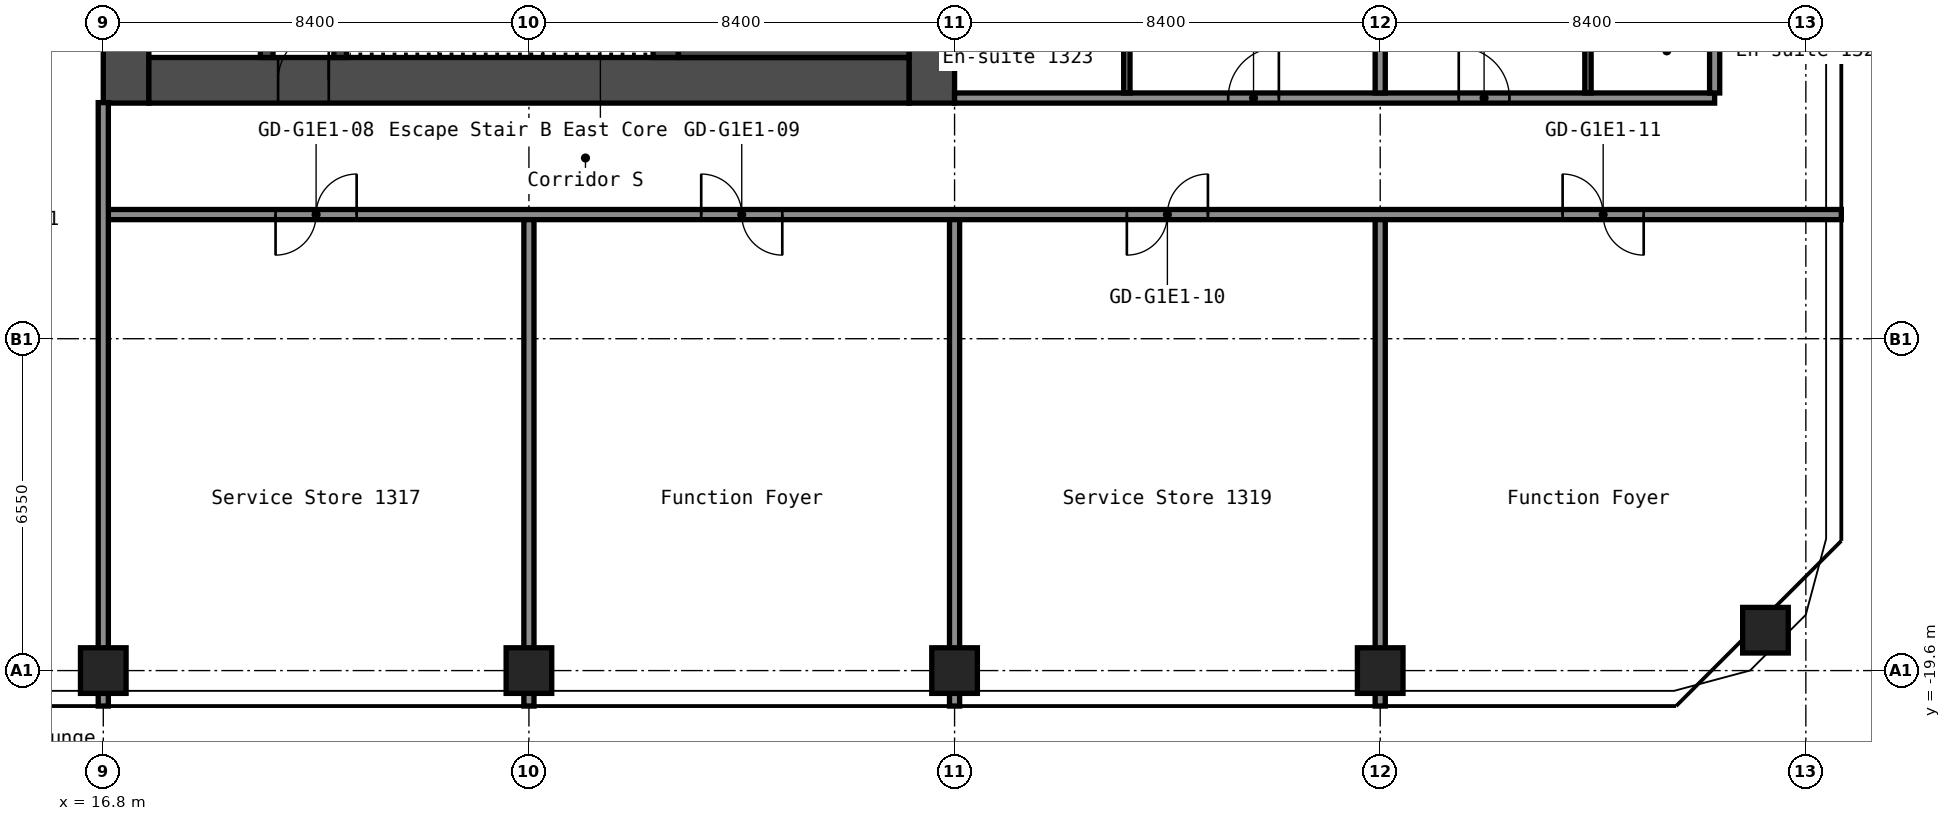
"""IFC4 building model, lengths in metres.
Left out: names, types, materials, properties, quantities, classifications, styles, units other than length and angle.
Written with IfcOpenShell. Run it as: python <this file> out.ifc"""

import sys

from ifc_helpers import new_model, si_unit, direction, frame, frame_2d, origin, origin_2d, place, context, subcontext, project, spatial, rectangle, hollow_rectangle, extrude, element, fill, save


model = new_model("IFC4")
c1 = context("Model", 3, precision=1e-05, world=origin(), true_north=direction((0.0, 1.0)))
c2 = subcontext(c1, "Body", "Model", "MODEL_VIEW")
j1 = project(units=[si_unit("LENGTHUNIT", "METRE"), si_unit("PLANEANGLEUNIT", "RADIAN")], contexts=[c1])
p1 = place(None, origin())
s1 = spatial("IfcSite", under=j1, at=p1, CompositionType="ELEMENT")
p2 = place(p1, origin())
s2 = spatial("IfcBuilding", under=s1, at=p2, CompositionType="ELEMENT")
p3 = place(p2, frame((0.0, 0.0, 48.6)))
s3 = spatial("IfcBuildingStorey", under=s2, at=p3, CompositionType="ELEMENT", Elevation=48.6)
for number, where, z_axis, x_axis in (
    (1, (16.8, -19.6, 0.0), (0.0, 0.0, 1.0), (1.0, 0.0, 0.0)),
    (2, (25.2, -19.6, 0.0), (0.0, 0.0, 1.0), (1.0, 0.0, 0.0)),
    (3, (33.6, -19.6, 0.0), (0.0, 0.0, 1.0), (1.0, 0.0, 0.0)),
    (4, (42.0, -19.6, 0.0), (0.0, 0.0, 1.0), (1.0, 0.0, 0.0)),
    (5, (49.603, -18.803, 0.0), (0.0, 0.0, 1.0), (1.0, 0.0, 0.0)),
):
    element("IfcColumn", number, at=place(p3, frame(where, z_axis=z_axis, x_axis=x_axis)), inside=s3, PredefinedType="COLUMN", context=c2, shape_type="SweptSolid", body=[
        extrude(hollow_rectangle(XDim=0.9, YDim=0.9, WallThickness=0.036, at=origin_2d()), origin(), (0.0, 0.0, 1.0), 2.8),
    ])
p4 = place(p3, frame((17.25, -8.4, 0.0), z_axis=(0.0, 0.0, 1.0), x_axis=(0.0, 1.0, 0.0)))
e6 = element("IfcWall", 6, at=p4, inside=s3, PredefinedType="SHEAR", context=c2, shape_type="SweptSolid", body=[
    extrude(rectangle(XDim=16.8, YDim=0.9, at=frame_2d((8.4, 0.0))), origin(), (0.0, 0.0, 1.0), 2.8),
])
p5 = place(p4, frame((12.75, 0.0, 0.0)))
e7 = element("IfcOpeningElement", 7, at=p5, cuts=e6, PredefinedType="OPENING", context=c2, shape_type="SweptSolid", body=[
    extrude(rectangle(XDim=1.2, YDim=2.1, at=frame_2d((0.6, 1.05))), frame((0.0, 0.46, 0.0), z_axis=(0.0, -1.0, 0.0), x_axis=(1.0, 0.0, 0.0)), (0.0, 0.0, 1.0), 0.92),
])
p6 = place(p4, frame((2.85, 0.0, 0.0)))
e8 = element("IfcOpeningElement", 8, at=p6, cuts=e6, PredefinedType="OPENING", context=c2, shape_type="SweptSolid", body=[
    extrude(rectangle(XDim=1.2, YDim=2.1, at=frame_2d((0.6, 1.05))), frame((0.0, 0.46, 0.0), z_axis=(0.0, -1.0, 0.0), x_axis=(1.0, 0.0, 0.0)), (0.0, 0.0, 1.0), 0.92),
])
p7 = place(p3, frame((33.15, -8.4, 0.0), z_axis=(0.0, 0.0, 1.0), x_axis=(0.0, 1.0, 0.0)))
e9 = element("IfcWall", 9, at=p7, inside=s3, PredefinedType="SHEAR", context=c2, shape_type="SweptSolid", body=[
    extrude(rectangle(XDim=16.8, YDim=0.9, at=frame_2d((8.4, 0.0))), origin(), (0.0, 0.0, 1.0), 2.8),
])
p8 = place(p3, frame((17.7, -7.95, 0.0), z_axis=(0.0, 0.0, 1.0), x_axis=(1.0, 0.0, 0.0)))
e10 = element("IfcWall", 10, at=p8, inside=s3, PredefinedType="SHEAR", context=c2, shape_type="SweptSolid", body=[
    extrude(rectangle(XDim=15.0, YDim=0.9, at=frame_2d((7.5, 0.0))), origin(), (0.0, 0.0, 1.0), 2.8),
])
p9 = place(p8, frame((2.55, 0.0, 0.0)))
e11 = element("IfcOpeningElement", 11, at=p9, cuts=e10, PredefinedType="OPENING", context=c2, shape_type="SweptSolid", body=[
    extrude(rectangle(XDim=1.0, YDim=2.1, at=frame_2d((0.5, 1.05))), frame((0.0, 0.46, 0.0), z_axis=(0.0, -1.0, 0.0), x_axis=(1.0, 0.0, 0.0)), (0.0, 0.0, 1.0), 0.92),
])
p10 = place(p3, frame((20.025, -7.5, 0.0), z_axis=(0.0, 0.0, 1.0), x_axis=(0.0, 1.0, 0.0)))
e12 = element("IfcWall", 12, at=p10, inside=s3, PredefinedType="SHEAR", context=c2, shape_type="SweptSolid", body=[
    extrude(rectangle(XDim=6.3, YDim=0.25, at=frame_2d((3.15, 0.0))), origin(), (0.0, 0.0, 1.0), 2.8),
])
p11 = place(p10, frame((2.4, 0.0, 0.0)))
e13 = element("IfcOpeningElement", 13, at=p11, cuts=e12, PredefinedType="OPENING", context=c2, shape_type="SweptSolid", body=[
    extrude(rectangle(XDim=1.0, YDim=2.1, at=frame_2d((0.5, 1.05))), frame((0.0, 0.135, 0.0), z_axis=(0.0, -1.0, 0.0), x_axis=(1.0, 0.0, 0.0)), (0.0, 0.0, 1.0), 0.27),
])
p12 = place(p3, frame((21.475, -7.5, 0.0), z_axis=(0.0, 0.0, 1.0), x_axis=(0.0, 1.0, 0.0)))
e14 = element("IfcWall", 14, at=p12, inside=s3, PredefinedType="SHEAR", context=c2, shape_type="SweptSolid", body=[
    extrude(rectangle(XDim=3.75, YDim=0.25, at=frame_2d((1.875, 0.0))), origin(), (0.0, 0.0, 1.0), 2.8),
])
p13 = place(p12, frame((1.3, 0.0, 0.0)))
e15 = element("IfcOpeningElement", 15, at=p13, cuts=e14, PredefinedType="OPENING", context=c2, shape_type="SweptSolid", body=[
    extrude(rectangle(XDim=1.2, YDim=2.1, at=frame_2d((0.6, 1.05))), frame((0.0, 0.135, 0.0), z_axis=(0.0, -1.0, 0.0), x_axis=(1.0, 0.0, 0.0)), (0.0, 0.0, 1.0), 0.27),
])
p14 = place(p3, frame((27.9, -7.5, 0.0), z_axis=(0.0, 0.0, 1.0), x_axis=(0.0, 1.0, 0.0)))
e16 = element("IfcWall", 16, at=p14, inside=s3, PredefinedType="SHEAR", context=c2, shape_type="SweptSolid", body=[
    extrude(rectangle(XDim=3.75, YDim=0.5, at=frame_2d((1.875, 0.0))), origin(), (0.0, 0.0, 1.0), 2.8),
])
p15 = place(p3, frame((28.15, -6.75, 0.0), z_axis=(0.0, 0.0, 1.0), x_axis=(1.0, 0.0, 0.0)))
e17 = element("IfcWall", 17, at=p15, inside=s3, PredefinedType="SHEAR", context=c2, shape_type="SweptSolid", body=[
    extrude(rectangle(XDim=4.55, YDim=1.5, at=frame_2d((2.275, 0.0))), origin(), (0.0, 0.0, 1.0), 2.8),
])
p16 = place(p3, frame((16.8, -10.6, 0.0), z_axis=(0.0, 0.0, 1.0), x_axis=(1.0, 0.0, 0.0)))
e18 = element("IfcWall", 18, at=p16, inside=s3, PredefinedType="PARTITIONING", context=c2, shape_type="SweptSolid", body=[
    extrude(rectangle(XDim=34.3, YDim=0.2, at=frame_2d((17.15, 0.0))), origin(), (0.0, 0.0, 1.0), 2.8),
])
p17 = place(p16, frame((3.4, 0.0, 0.0)))
e19 = element("IfcOpeningElement", 19, at=p17, cuts=e18, PredefinedType="OPENING", context=c2, shape_type="SweptSolid", body=[
    extrude(rectangle(XDim=1.6, YDim=2.1, at=frame_2d((0.8, 1.05))), frame((0.0, 0.11, 0.0), z_axis=(0.0, -1.0, 0.0), x_axis=(1.0, 0.0, 0.0)), (0.0, 0.0, 1.0), 0.22),
])
p18 = place(p16, frame((11.8, 0.0, 0.0)))
e20 = element("IfcOpeningElement", 20, at=p18, cuts=e18, PredefinedType="OPENING", context=c2, shape_type="SweptSolid", body=[
    extrude(rectangle(XDim=1.6, YDim=2.1, at=frame_2d((0.8, 1.05))), frame((0.0, 0.11, 0.0), z_axis=(0.0, -1.0, 0.0), x_axis=(1.0, 0.0, 0.0)), (0.0, 0.0, 1.0), 0.22),
])
p19 = place(p16, frame((20.2, 0.0, 0.0)))
e21 = element("IfcOpeningElement", 21, at=p19, cuts=e18, PredefinedType="OPENING", context=c2, shape_type="SweptSolid", body=[
    extrude(rectangle(XDim=1.6, YDim=2.1, at=frame_2d((0.8, 1.05))), frame((0.0, 0.11, 0.0), z_axis=(0.0, -1.0, 0.0), x_axis=(1.0, 0.0, 0.0)), (0.0, 0.0, 1.0), 0.22),
])
p20 = place(p16, frame((28.8, 0.0, 0.0)))
e22 = element("IfcOpeningElement", 22, at=p20, cuts=e18, PredefinedType="OPENING", context=c2, shape_type="SweptSolid", body=[
    extrude(rectangle(XDim=1.6, YDim=2.1, at=frame_2d((0.8, 1.05))), frame((0.0, 0.11, 0.0), z_axis=(0.0, -1.0, 0.0), x_axis=(1.0, 0.0, 0.0)), (0.0, 0.0, 1.0), 0.22),
])
p21 = place(p3, frame((33.6, -8.3, 0.0), z_axis=(0.0, 0.0, 1.0), x_axis=(1.0, 0.0, 0.0)))
e23 = element("IfcWall", 23, at=p21, inside=s3, PredefinedType="PARTITIONING", context=c2, shape_type="SweptSolid", body=[
    extrude(rectangle(XDim=15.0, YDim=0.2, at=frame_2d((7.5, 0.0))), origin(), (0.0, 0.0, 1.0), 2.8),
])
p22 = place(p21, frame((5.4, 0.0, 0.0)))
e24 = element("IfcOpeningElement", 24, at=p22, cuts=e23, PredefinedType="OPENING", context=c2, shape_type="SweptSolid", body=[
    extrude(rectangle(XDim=1.0, YDim=2.1, at=frame_2d((0.5, 1.05))), frame((0.0, 0.11, 0.0), z_axis=(0.0, -1.0, 0.0), x_axis=(1.0, 0.0, 0.0)), (0.0, 0.0, 1.0), 0.22),
])
p23 = place(p21, frame((9.95, 0.0, 0.0)))
e25 = element("IfcOpeningElement", 25, at=p23, cuts=e23, PredefinedType="OPENING", context=c2, shape_type="SweptSolid", body=[
    extrude(rectangle(XDim=1.0, YDim=2.1, at=frame_2d((0.5, 1.05))), frame((0.0, 0.11, 0.0), z_axis=(0.0, -1.0, 0.0), x_axis=(1.0, 0.0, 0.0)), (0.0, 0.0, 1.0), 0.22),
])
p24 = place(p3, frame((16.8, -20.3, 0.0), z_axis=(0.0, 0.0, 1.0), x_axis=(0.0, 1.0, 0.0)))
e26 = element("IfcWall", 26, at=p24, inside=s3, PredefinedType="PARTITIONING", context=c2, shape_type="SweptSolid", body=[
    extrude(rectangle(XDim=11.91, YDim=0.2, at=frame_2d((5.955, 0.0))), origin(), (0.0, 0.0, 1.0), 2.8),
])
for number, where, z_axis, x_axis in (
    (27, (25.2, -20.3, 0.0), (0.0, 0.0, 1.0), (0.0, 1.0, 0.0)),
    (28, (33.6, -20.3, 0.0), (0.0, 0.0, 1.0), (0.0, 1.0, 0.0)),
):
    element("IfcWall", number, at=place(p3, frame(where, z_axis=z_axis, x_axis=x_axis)), inside=s3, PredefinedType="PARTITIONING", context=c2, shape_type="SweptSolid", body=[
        extrude(rectangle(XDim=9.6, YDim=0.2, at=frame_2d((4.8, 0.0))), origin(), (0.0, 0.0, 1.0), 2.8),
    ])
p25 = place(p3, frame((37.0, -8.2, 0.0), z_axis=(0.0, 0.0, 1.0), x_axis=(0.0, 1.0, 0.0)))
e29 = element("IfcWall", 29, at=p25, inside=s3, PredefinedType="PARTITIONING", context=c2, shape_type="SweptSolid", body=[
    extrude(rectangle(XDim=3.3, YDim=0.125, at=frame_2d((1.65, 0.0))), origin(), (0.0, 0.0, 1.0), 2.8),
])
p26 = place(p3, frame((42.0, -20.3, 0.0), z_axis=(0.0, 0.0, 1.0), x_axis=(0.0, 1.0, 0.0)))
e30 = element("IfcWall", 30, at=p26, inside=s3, PredefinedType="PARTITIONING", context=c2, shape_type="SweptSolid", body=[
    extrude(rectangle(XDim=9.6, YDim=0.2, at=frame_2d((4.8, 0.0))), origin(), (0.0, 0.0, 1.0), 2.8),
])
p27 = place(p3, frame((42.0, -8.2, 0.0), z_axis=(0.0, 0.0, 1.0), x_axis=(0.0, 1.0, 0.0)))
e31 = element("IfcWall", 31, at=p27, inside=s3, PredefinedType="PARTITIONING", context=c2, shape_type="SweptSolid", body=[
    extrude(rectangle(XDim=16.4, YDim=0.2, at=frame_2d((8.2, 0.0))), origin(), (0.0, 0.0, 1.0), 2.8),
])
p28 = place(p3, frame((46.1, -8.2, 0.0), z_axis=(0.0, 0.0, 1.0), x_axis=(0.0, 1.0, 0.0)))
e32 = element("IfcWall", 32, at=p28, inside=s3, PredefinedType="PARTITIONING", context=c2, shape_type="SweptSolid", body=[
    extrude(rectangle(XDim=2.9, YDim=0.125, at=frame_2d((1.45, 0.0))), origin(), (0.0, 0.0, 1.0), 2.8),
])
p29 = place(p28, frame((1.5, 0.0, 0.0)))
e33 = element("IfcOpeningElement", 33, at=p29, cuts=e32, PredefinedType="OPENING", context=c2, shape_type="SweptSolid", body=[
    extrude(rectangle(XDim=0.8, YDim=2.1, at=frame_2d((0.4, 1.05))), frame((0.0, 0.073, 0.0), z_axis=(0.0, -1.0, 0.0), x_axis=(1.0, 0.0, 0.0)), (0.0, 0.0, 1.0), 0.145),
])
p30 = place(p3, frame((48.6, -8.2, 0.0), z_axis=(0.0, 0.0, 1.0), x_axis=(0.0, 1.0, 0.0)))
e34 = element("IfcWall", 34, at=p30, inside=s3, PredefinedType="PARTITIONING", context=c2, shape_type="SweptSolid", body=[
    extrude(rectangle(XDim=16.4, YDim=0.2, at=frame_2d((8.2, 0.0))), origin(), (0.0, 0.0, 1.0), 2.8),
])
p31 = place(p9, origin())
e35 = element("IfcDoor", 35, at=p31, inside=s3, OperationType="SINGLE_SWING_LEFT", PredefinedType="DOOR", context=c2, shape_type="SweptSolid", body=[
    extrude(rectangle(XDim=1.0, YDim=2.1, at=frame_2d((0.5, 1.05))), frame((0.0, 0.025, 0.0), z_axis=(0.0, -1.0, 0.0), x_axis=(1.0, 0.0, 0.0)), (0.0, 0.0, 1.0), 0.05),
])
fill(e11, e35)
p32 = place(p17, origin())
e36 = element("IfcDoor", 36, at=p32, inside=s3, OperationType="DOUBLE_DOOR_SINGLE_SWING", PredefinedType="DOOR", context=c2, shape_type="SweptSolid", body=[
    extrude(rectangle(XDim=1.6, YDim=2.1, at=frame_2d((0.8, 1.05))), frame((0.0, 0.025, 0.0), z_axis=(0.0, -1.0, 0.0), x_axis=(1.0, 0.0, 0.0)), (0.0, 0.0, 1.0), 0.05),
])
fill(e19, e36)
p33 = place(p18, origin())
e37 = element("IfcDoor", 37, at=p33, inside=s3, OperationType="DOUBLE_DOOR_SINGLE_SWING", PredefinedType="DOOR", context=c2, shape_type="SweptSolid", body=[
    extrude(rectangle(XDim=1.6, YDim=2.1, at=frame_2d((0.8, 1.05))), frame((0.0, 0.025, 0.0), z_axis=(0.0, -1.0, 0.0), x_axis=(1.0, 0.0, 0.0)), (0.0, 0.0, 1.0), 0.05),
])
fill(e20, e37)
p34 = place(p19, origin())
e38 = element("IfcDoor", 38, at=p34, inside=s3, OperationType="DOUBLE_DOOR_SINGLE_SWING", PredefinedType="DOOR", context=c2, shape_type="SweptSolid", body=[
    extrude(rectangle(XDim=1.6, YDim=2.1, at=frame_2d((0.8, 1.05))), frame((0.0, 0.025, 0.0), z_axis=(0.0, -1.0, 0.0), x_axis=(1.0, 0.0, 0.0)), (0.0, 0.0, 1.0), 0.05),
])
fill(e21, e38)
p35 = place(p20, origin())
e39 = element("IfcDoor", 39, at=p35, inside=s3, OperationType="DOUBLE_DOOR_SINGLE_SWING", PredefinedType="DOOR", context=c2, shape_type="SweptSolid", body=[
    extrude(rectangle(XDim=1.6, YDim=2.1, at=frame_2d((0.8, 1.05))), frame((0.0, 0.025, 0.0), z_axis=(0.0, -1.0, 0.0), x_axis=(1.0, 0.0, 0.0)), (0.0, 0.0, 1.0), 0.05),
])
fill(e22, e39)
p36 = place(p22, origin())
e40 = element("IfcDoor", 40, at=p36, inside=s3, OperationType="SINGLE_SWING_LEFT", PredefinedType="DOOR", context=c2, shape_type="SweptSolid", body=[
    extrude(rectangle(XDim=1.0, YDim=2.1, at=frame_2d((0.5, 1.05))), frame((0.0, 0.025, 0.0), z_axis=(0.0, -1.0, 0.0), x_axis=(1.0, 0.0, 0.0)), (0.0, 0.0, 1.0), 0.05),
])
fill(e24, e40)
p37 = place(p23, origin())
e41 = element("IfcDoor", 41, at=p37, inside=s3, OperationType="SINGLE_SWING_RIGHT", PredefinedType="DOOR", context=c2, shape_type="SweptSolid", body=[
    extrude(rectangle(XDim=1.0, YDim=2.1, at=frame_2d((0.5, 1.05))), frame((0.0, 0.025, 0.0), z_axis=(0.0, -1.0, 0.0), x_axis=(1.0, 0.0, 0.0)), (0.0, 0.0, 1.0), 0.05),
])
fill(e25, e41)
save(model, sys.argv[1])
